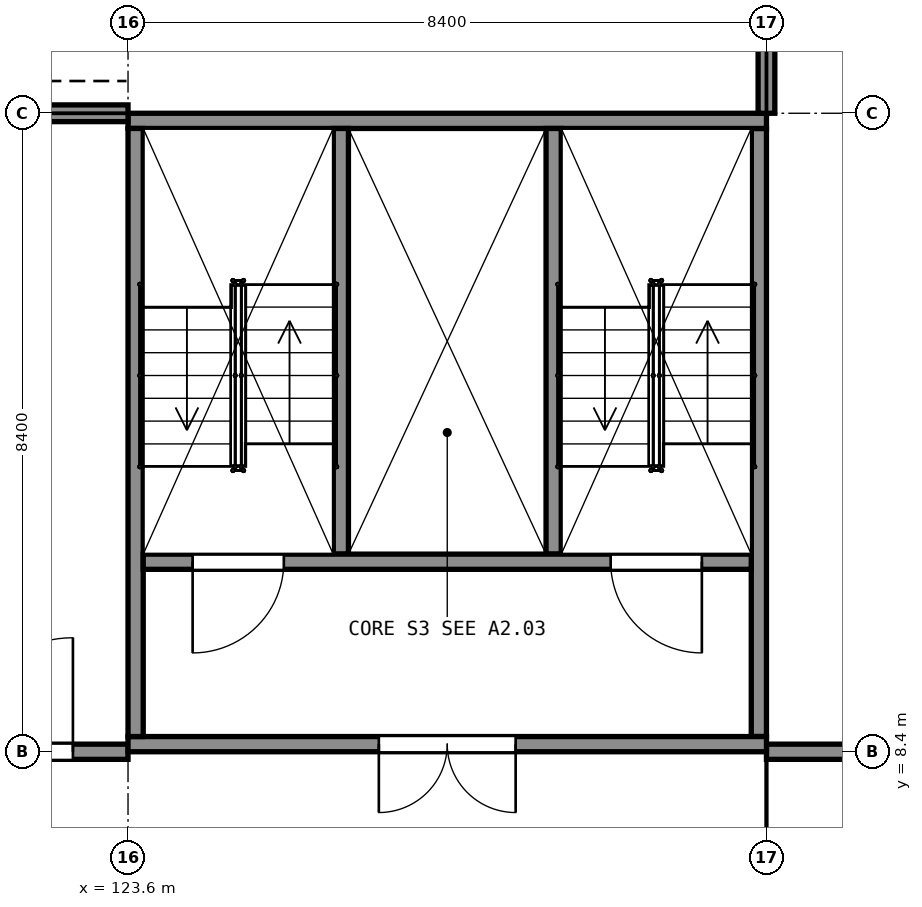
"""IFC4 building model, lengths in metres.
Left out: names, types, materials, properties, quantities, classifications, styles, units other than length and angle.
Written with IfcOpenShell. Run it as: python <this file> out.ifc"""

import sys

from ifc_helpers import new_model, si_unit, direction, frame, frame_2d, origin, place, context, subcontext, project, spatial, rectangle, extrude, element, fill, save


model = new_model("IFC4")
c1 = context("Model", 3, precision=1e-05, world=origin(), true_north=direction((0.0, 1.0)))
c2 = subcontext(c1, "Body", "Model", "MODEL_VIEW")
j1 = project(units=[si_unit("LENGTHUNIT", "METRE"), si_unit("PLANEANGLEUNIT", "RADIAN")], contexts=[c1])
p1 = place(None, origin())
s1 = spatial("IfcSite", under=j1, at=p1, CompositionType="ELEMENT")
p2 = place(p1, origin())
s2 = spatial("IfcBuilding", under=s1, at=p2, CompositionType="ELEMENT")
p3 = place(p2, frame((0.0, 0.0, 10.5)))
s3 = spatial("IfcBuildingStorey", under=s2, at=p3, CompositionType="ELEMENT", Elevation=10.5)
p4 = place(p3, frame((123.6, 8.5, 0.0), z_axis=(0.0, 0.0, 1.0), x_axis=(1.0, 0.0, 0.0)))
e1 = element("IfcWall", 1, at=p4, inside=s3, PredefinedType="SHEAR", context=c2, shape_type="SweptSolid", body=[
    extrude(rectangle(XDim=8.4, YDim=0.2, at=frame_2d((4.2, 0.0))), origin(), (0.0, 0.0, 1.0), 9.5),
])
p5 = place(p4, frame((3.3, 0.0, 0.0)))
e2 = element("IfcOpeningElement", 2, at=p5, cuts=e1, PredefinedType="OPENING", context=c2, shape_type="SweptSolid", body=[
    extrude(rectangle(XDim=1.8, YDim=2.1, at=frame_2d((0.9, 1.05))), frame((0.0, 0.11, 0.0), z_axis=(0.0, -1.0, 0.0), x_axis=(1.0, 0.0, 0.0)), (0.0, 0.0, 1.0), 0.22),
])
p6 = place(p3, frame((123.6, 16.7, 0.0), z_axis=(0.0, 0.0, 1.0), x_axis=(1.0, 0.0, 0.0)))
e3 = element("IfcWall", 3, at=p6, inside=s3, PredefinedType="SHEAR", context=c2, shape_type="SweptSolid", body=[
    extrude(rectangle(XDim=8.4, YDim=0.2, at=frame_2d((4.2, 0.0))), origin(), (0.0, 0.0, 1.0), 9.5),
])
for number, where, z_axis, x_axis in (
    (4, (123.7, 8.6, 0.0), (0.0, 0.0, 1.0), (0.0, 1.0, 0.0)),
    (5, (131.9, 8.6, 0.0), (0.0, 0.0, 1.0), (0.0, 1.0, 0.0)),
):
    element("IfcWall", number, at=place(p3, frame(where, z_axis=z_axis, x_axis=x_axis)), inside=s3, PredefinedType="SHEAR", context=c2, shape_type="SweptSolid", body=[
        extrude(rectangle(XDim=8.0, YDim=0.2, at=frame_2d((4.0, 0.0))), origin(), (0.0, 0.0, 1.0), 9.5),
    ])
p7 = place(p3, frame((123.8, 10.9, 0.0), z_axis=(0.0, 0.0, 1.0), x_axis=(1.0, 0.0, 0.0)))
e6 = element("IfcWall", 6, at=p7, inside=s3, PredefinedType="SHEAR", context=c2, shape_type="SweptSolid", body=[
    extrude(rectangle(XDim=8.0, YDim=0.2, at=frame_2d((4.0, 0.0))), origin(), (0.0, 0.0, 1.0), 9.5),
])
p8 = place(p7, frame((0.65, 0.0, 0.0)))
e7 = element("IfcOpeningElement", 7, at=p8, cuts=e6, PredefinedType="OPENING", context=c2, shape_type="SweptSolid", body=[
    extrude(rectangle(XDim=1.2, YDim=2.1, at=frame_2d((0.6, 1.05))), frame((0.0, 0.11, 0.0), z_axis=(0.0, -1.0, 0.0), x_axis=(1.0, 0.0, 0.0)), (0.0, 0.0, 1.0), 0.22),
])
p9 = place(p7, frame((6.15, 0.0, 0.0)))
e8 = element("IfcOpeningElement", 8, at=p9, cuts=e6, PredefinedType="OPENING", context=c2, shape_type="SweptSolid", body=[
    extrude(rectangle(XDim=1.2, YDim=2.1, at=frame_2d((0.6, 1.05))), frame((0.0, 0.11, 0.0), z_axis=(0.0, -1.0, 0.0), x_axis=(1.0, 0.0, 0.0)), (0.0, 0.0, 1.0), 0.22),
])
for number, where, z_axis, x_axis in (
    (9, (126.4, 11.0, 0.0), (0.0, 0.0, 1.0), (0.0, 1.0, 0.0)),
    (10, (129.2, 11.0, 0.0), (0.0, 0.0, 1.0), (0.0, 1.0, 0.0)),
):
    element("IfcWall", number, at=place(p3, frame(where, z_axis=z_axis, x_axis=x_axis)), inside=s3, PredefinedType="SHEAR", context=c2, shape_type="SweptSolid", body=[
        extrude(rectangle(XDim=5.6, YDim=0.2, at=frame_2d((2.8, 0.0))), origin(), (0.0, 0.0, 1.0), 9.5),
    ])
p10 = place(p3, frame((132.0, 16.8, 0.0), z_axis=(0.0, 0.0, 1.0), x_axis=(0.0, 1.0, 0.0)))
e11 = element("IfcWall", 11, at=p10, inside=s3, PredefinedType="SOLIDWALL", context=c2, shape_type="SweptSolid", body=[
    extrude(rectangle(XDim=8.05, YDim=0.22, at=frame_2d((4.025, 0.0))), origin(), (0.0, 0.0, 1.0), 8.44),
])
p11 = place(p10, frame((2.225, 0.0, 0.9)))
e12 = element("IfcOpeningElement", 12, at=p11, cuts=e11, PredefinedType="OPENING", context=c2, shape_type="SweptSolid", body=[
    extrude(rectangle(XDim=3.6, YDim=1.5, at=frame_2d((1.8, 0.75))), frame((0.0, 0.12, 0.0), z_axis=(0.0, -1.0, 0.0), x_axis=(1.0, 0.0, 0.0)), (0.0, 0.0, 1.0), 0.24),
])
p12 = place(p3, frame((115.55, 16.8, 0.0), z_axis=(0.0, 0.0, 1.0), x_axis=(1.0, 0.0, 0.0)))
e13 = element("IfcWall", 13, at=p12, inside=s3, PredefinedType="SOLIDWALL", context=c2, shape_type="SweptSolid", body=[
    extrude(rectangle(XDim=8.05, YDim=0.22, at=frame_2d((4.025, 0.0))), origin(), (0.0, 0.0, 1.0), 8.44),
])
p13 = place(p12, frame((2.225, 0.0, 0.9)))
e14 = element("IfcOpeningElement", 14, at=p13, cuts=e13, PredefinedType="OPENING", context=c2, shape_type="SweptSolid", body=[
    extrude(rectangle(XDim=3.6, YDim=1.5, at=frame_2d((1.8, 0.75))), frame((0.0, 0.12, 0.0), z_axis=(0.0, -1.0, 0.0), x_axis=(1.0, 0.0, 0.0)), (0.0, 0.0, 1.0), 0.24),
])
p14 = place(p3, frame((132.0, 8.4, 0.0), z_axis=(0.0, 0.0, 1.0), x_axis=(1.0, 0.0, 0.0)))
e15 = element("IfcWall", 15, at=p14, inside=s3, PredefinedType="PARTITIONING", context=c2, shape_type="SweptSolid", body=[
    extrude(rectangle(XDim=8.05, YDim=0.2, at=frame_2d((4.025, 0.0))), origin(), (0.0, 0.0, 1.0), 8.4),
])
p15 = place(p3, frame((115.55, 8.4, 0.0), z_axis=(0.0, 0.0, 1.0), x_axis=(1.0, 0.0, 0.0)))
e16 = element("IfcWall", 16, at=p15, inside=s3, PredefinedType="PARTITIONING", context=c2, shape_type="SweptSolid", body=[
    extrude(rectangle(XDim=8.05, YDim=0.2, at=frame_2d((4.025, 0.0))), origin(), (0.0, 0.0, 1.0), 8.4),
])
p16 = place(p15, frame((4.325, 0.0, 0.0)))
e17 = element("IfcOpeningElement", 17, at=p16, cuts=e16, PredefinedType="OPENING", context=c2, shape_type="SweptSolid", body=[
    extrude(rectangle(XDim=3.0, YDim=3.0, at=frame_2d((1.5, 1.5))), frame((0.0, 0.11, 0.0), z_axis=(0.0, -1.0, 0.0), x_axis=(1.0, 0.0, 0.0)), (0.0, 0.0, 1.0), 0.22),
])
p17 = place(p16, origin())
e18 = element("IfcDoor", 18, at=p17, inside=s3, OperationType="DOUBLE_DOOR_SINGLE_SWING", PredefinedType="DOOR", context=c2, shape_type="SweptSolid", body=[
    extrude(rectangle(XDim=3.0, YDim=3.0, at=frame_2d((1.5, 1.5))), frame((0.0, 0.025, 0.0), z_axis=(0.0, -1.0, 0.0), x_axis=(1.0, 0.0, 0.0)), (0.0, 0.0, 1.0), 0.05),
])
fill(e17, e18)
p18 = place(p5, origin())
e19 = element("IfcDoor", 19, at=p18, inside=s3, OperationType="DOUBLE_DOOR_SINGLE_SWING", PredefinedType="DOOR", context=c2, shape_type="SweptSolid", body=[
    extrude(rectangle(XDim=1.8, YDim=2.1, at=frame_2d((0.9, 1.05))), frame((0.0, 0.025, 0.0), z_axis=(0.0, -1.0, 0.0), x_axis=(1.0, 0.0, 0.0)), (0.0, 0.0, 1.0), 0.05),
])
fill(e2, e19)
p19 = place(p8, origin())
e20 = element("IfcDoor", 20, at=p19, inside=s3, OperationType="SINGLE_SWING_LEFT", PredefinedType="DOOR", context=c2, shape_type="SweptSolid", body=[
    extrude(rectangle(XDim=1.2, YDim=2.1, at=frame_2d((0.6, 1.05))), frame((0.0, 0.025, 0.0), z_axis=(0.0, -1.0, 0.0), x_axis=(1.0, 0.0, 0.0)), (0.0, 0.0, 1.0), 0.05),
])
fill(e7, e20)
p20 = place(p9, origin())
e21 = element("IfcDoor", 21, at=p20, inside=s3, OperationType="SINGLE_SWING_RIGHT", PredefinedType="DOOR", context=c2, shape_type="SweptSolid", body=[
    extrude(rectangle(XDim=1.2, YDim=2.1, at=frame_2d((0.6, 1.05))), frame((0.0, 0.025, 0.0), z_axis=(0.0, -1.0, 0.0), x_axis=(1.0, 0.0, 0.0)), (0.0, 0.0, 1.0), 0.05),
])
fill(e8, e21)
save(model, sys.argv[1])
